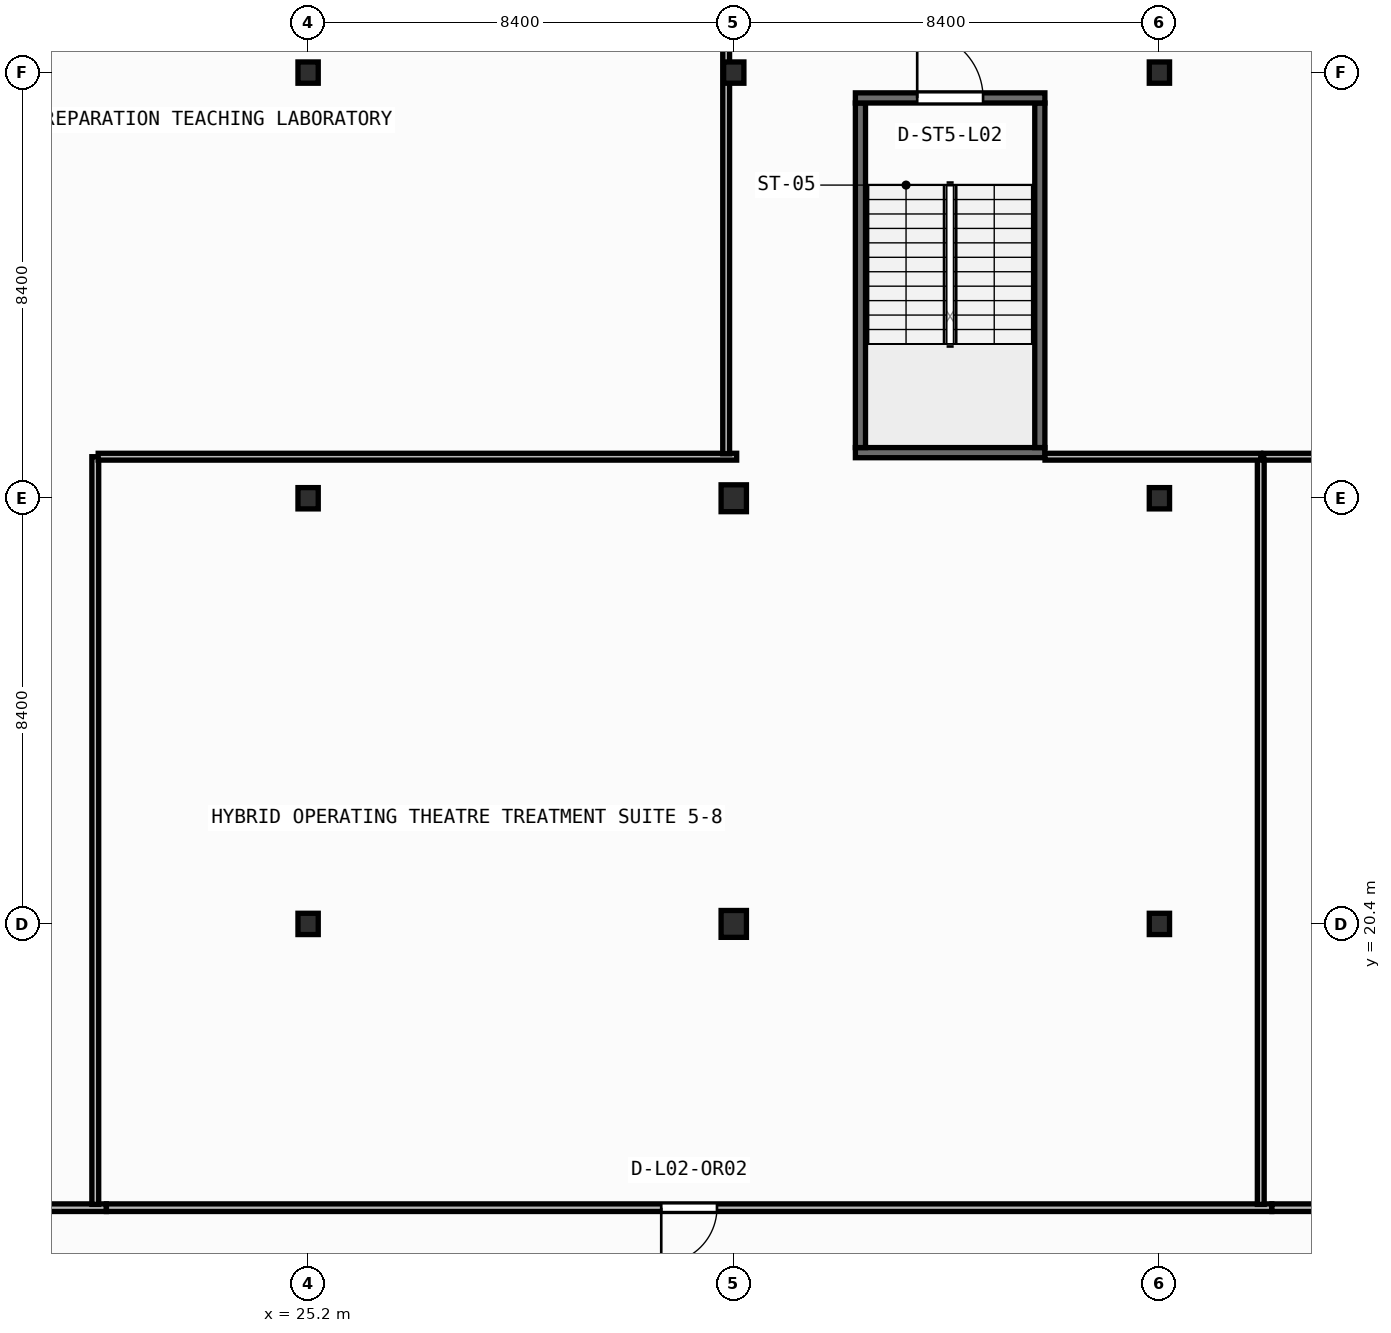
"""IFC4 building model, lengths in metres.
Left out: names, types, materials, properties, quantities, classifications, styles, units other than length and angle.
Written with IfcOpenShell. Run it as: python <this file> out.ifc"""

import sys

from ifc_helpers import new_model, si_unit, direction, frame, frame_2d, origin, origin_2d, place, context, subcontext, project, spatial, rectangle, i_section, extrude, element, fill, save


model = new_model("IFC4")
c1 = context("Model", 3, precision=1e-05, world=origin(), true_north=direction((0.0, 1.0)))
c2 = subcontext(c1, "Body", "Model", "MODEL_VIEW")
j1 = project(units=[si_unit("LENGTHUNIT", "METRE"), si_unit("PLANEANGLEUNIT", "RADIAN")], contexts=[c1])
p1 = place(None, origin())
s1 = spatial("IfcSite", under=j1, at=p1, CompositionType="ELEMENT")
p2 = place(p1, origin())
s2 = spatial("IfcBuilding", under=s1, at=p2, CompositionType="ELEMENT")
p3 = place(p2, frame((0.0, 0.0, 9.0)))
s3 = spatial("IfcBuildingStorey", under=s2, at=p3, CompositionType="ELEMENT", Elevation=9.0)
p4 = place(p3, frame((25.2, 20.4, 0.0), z_axis=(0.0, 0.0, 1.0), x_axis=(1.0, 0.0, 0.0)))
e1 = element("IfcColumn", 1, at=p4, inside=s3, PredefinedType="COLUMN", context=c2, shape_type="SweptSolid", body=[
    extrude(i_section(OverallWidth=0.4, OverallDepth=0.42, WebThickness=0.025, FlangeThickness=0.04, at=origin_2d()), origin(), (0.0, 0.0, 1.0), 4.5),
])
p5 = place(p3, frame((33.6, 20.4, 0.0), z_axis=(0.0, 0.0, 1.0), x_axis=(1.0, 0.0, 0.0)))
e2 = element("IfcColumn", 2, at=p5, inside=s3, PredefinedType="COLUMN", context=c2, shape_type="SweptSolid", body=[
    extrude(i_section(OverallWidth=0.5, OverallDepth=0.53, WebThickness=0.028, FlangeThickness=0.045, at=origin_2d()), origin(), (0.0, 0.0, 1.0), 4.5),
])
for number, where, z_axis, x_axis in (
    (3, (42.0, 20.4, 0.0), (0.0, 0.0, 1.0), (1.0, 0.0, 0.0)),
    (4, (25.2, 28.8, 0.0), (0.0, 0.0, 1.0), (1.0, 0.0, 0.0)),
):
    element("IfcColumn", number, at=place(p3, frame(where, z_axis=z_axis, x_axis=x_axis)), inside=s3, PredefinedType="COLUMN", context=c2, shape_type="SweptSolid", body=[
        extrude(i_section(OverallWidth=0.4, OverallDepth=0.42, WebThickness=0.025, FlangeThickness=0.04, at=origin_2d()), origin(), (0.0, 0.0, 1.0), 4.5),
    ])
p6 = place(p3, frame((33.6, 28.8, 0.0), z_axis=(0.0, 0.0, 1.0), x_axis=(1.0, 0.0, 0.0)))
e5 = element("IfcColumn", 5, at=p6, inside=s3, PredefinedType="COLUMN", context=c2, shape_type="SweptSolid", body=[
    extrude(i_section(OverallWidth=0.5, OverallDepth=0.53, WebThickness=0.028, FlangeThickness=0.045, at=origin_2d()), origin(), (0.0, 0.0, 1.0), 4.5),
])
for number, where, z_axis, x_axis in (
    (6, (42.0, 28.8, 0.0), (0.0, 0.0, 1.0), (1.0, 0.0, 0.0)),
    (7, (25.2, 37.2, 0.0), (0.0, 0.0, 1.0), (1.0, 0.0, 0.0)),
    (8, (33.6, 37.2, 0.0), (0.0, 0.0, 1.0), (1.0, 0.0, 0.0)),
    (9, (42.0, 37.2, 0.0), (0.0, 0.0, 1.0), (1.0, 0.0, 0.0)),
):
    element("IfcColumn", number, at=place(p3, frame(where, z_axis=z_axis, x_axis=x_axis)), inside=s3, PredefinedType="COLUMN", context=c2, shape_type="SweptSolid", body=[
        extrude(i_section(OverallWidth=0.4, OverallDepth=0.42, WebThickness=0.025, FlangeThickness=0.04, at=origin_2d()), origin(), (0.0, 0.0, 1.0), 4.5),
    ])
p7 = place(p3, frame((36.0, 29.7, 0.0), z_axis=(0.0, 0.0, 1.0), x_axis=(1.0, 0.0, 0.0)))
e10 = element("IfcWall", 10, at=p7, inside=s3, PredefinedType="SHEAR", context=c2, shape_type="SweptSolid", body=[
    extrude(rectangle(XDim=3.74, YDim=0.2, at=frame_2d((1.87, 0.0))), origin(), (0.0, 0.0, 1.0), 4.25),
])
for number, where, z_axis, x_axis in (
    (11, (36.1, 29.8, 0.0), (0.0, 0.0, 1.0), (0.0, 1.0, 0.0)),
    (12, (39.64, 29.8, 0.0), (0.0, 0.0, 1.0), (0.0, 1.0, 0.0)),
):
    element("IfcWall", number, at=place(p3, frame(where, z_axis=z_axis, x_axis=x_axis)), inside=s3, PredefinedType="SHEAR", context=c2, shape_type="SweptSolid", body=[
        extrude(rectangle(XDim=6.8, YDim=0.2, at=frame_2d((3.4, 0.0))), origin(), (0.0, 0.0, 1.0), 4.25),
    ])
p8 = place(p3, frame((36.0, 36.7, 0.0), z_axis=(0.0, 0.0, 1.0), x_axis=(1.0, 0.0, 0.0)))
e13 = element("IfcWall", 13, at=p8, inside=s3, PredefinedType="SHEAR", context=c2, shape_type="SweptSolid", body=[
    extrude(rectangle(XDim=3.74, YDim=0.2, at=frame_2d((1.87, 0.0))), origin(), (0.0, 0.0, 1.0), 4.25),
])
p9 = place(p8, frame((1.22, 0.0, 0.0)))
e14 = element("IfcOpeningElement", 14, at=p9, cuts=e13, PredefinedType="OPENING", context=c2, shape_type="SweptSolid", body=[
    extrude(rectangle(XDim=1.3, YDim=2.15, at=frame_2d((0.65, 1.075))), frame((0.0, 0.11, 0.0), z_axis=(0.0, -1.0, 0.0), x_axis=(1.0, 0.0, 0.0)), (0.0, 0.0, 1.0), 0.22),
])
p10 = place(p3, frame((21.218, 14.8, 0.0), z_axis=(0.0, 0.0, 1.0), x_axis=(-1.0, 0.0, 0.0)))
e15 = element("IfcWall", 15, at=p10, inside=s3, PredefinedType="PARTITIONING", context=c2, shape_type="SweptSolid", body=[
    extrude(rectangle(XDim=14.126, YDim=0.15, at=frame_2d((7.063, 0.0))), origin(), (0.0, 0.0, 1.0), 4.25),
])
p11 = place(p10, frame((6.513, 0.0, 0.0)))
e16 = element("IfcOpeningElement", 16, at=p11, cuts=e15, PredefinedType="OPENING", context=c2, shape_type="SweptSolid", body=[
    extrude(rectangle(XDim=1.1, YDim=2.1, at=frame_2d((0.55, 1.05))), frame((0.0, 0.085, 0.0), z_axis=(0.0, -1.0, 0.0), x_axis=(1.0, 0.0, 0.0)), (0.0, 0.0, 1.0), 0.17),
])
p12 = place(p3, frame((44.218, 14.8, 0.0), z_axis=(0.0, 0.0, 1.0), x_axis=(-1.0, 0.0, 0.0)))
e17 = element("IfcWall", 17, at=p12, inside=s3, PredefinedType="PARTITIONING", context=c2, shape_type="SweptSolid", body=[
    extrude(rectangle(XDim=22.998, YDim=0.15, at=frame_2d((11.499, 0.0))), origin(), (0.0, 0.0, 1.0), 4.25),
])
p13 = place(p12, frame((10.949, 0.0, 0.0)))
e18 = element("IfcOpeningElement", 18, at=p13, cuts=e17, PredefinedType="OPENING", context=c2, shape_type="SweptSolid", body=[
    extrude(rectangle(XDim=1.1, YDim=2.1, at=frame_2d((0.55, 1.05))), frame((0.0, 0.085, 0.0), z_axis=(0.0, -1.0, 0.0), x_axis=(1.0, 0.0, 0.0)), (0.0, 0.0, 1.0), 0.17),
])
p14 = place(p3, frame((70.168, 14.8, 0.0), z_axis=(0.0, 0.0, 1.0), x_axis=(-1.0, 0.0, 0.0)))
e19 = element("IfcWall", 19, at=p14, inside=s3, PredefinedType="PARTITIONING", context=c2, shape_type="SweptSolid", body=[
    extrude(rectangle(XDim=25.948, YDim=0.15, at=frame_2d((12.974, 0.0))), origin(), (0.0, 0.0, 1.0), 4.25),
])
p15 = place(p14, frame((12.424, 0.0, 0.0)))
e20 = element("IfcOpeningElement", 20, at=p15, cuts=e19, PredefinedType="OPENING", context=c2, shape_type="SweptSolid", body=[
    extrude(rectangle(XDim=1.1, YDim=2.1, at=frame_2d((0.55, 1.05))), frame((0.0, 0.085, 0.0), z_axis=(0.0, -1.0, 0.0), x_axis=(1.0, 0.0, 0.0)), (0.0, 0.0, 1.0), 0.17),
])
for number, where, z_axis, x_axis in (
    (21, (21.0, 14.865, 0.0), (0.0, 0.0, 1.0), (0.0, 1.0, 0.0)),
    (22, (44.0, 14.865, 0.0), (0.0, 0.0, 1.0), (0.0, 1.0, 0.0)),
):
    element("IfcWall", number, at=place(p3, frame(where, z_axis=z_axis, x_axis=x_axis)), inside=s3, PredefinedType="PARTITIONING", context=c2, shape_type="SweptSolid", body=[
        extrude(rectangle(XDim=14.755, YDim=0.135, at=frame_2d((7.377, 0.0))), origin(), (0.0, 0.0, 1.0), 4.25),
    ])
p16 = place(p3, frame((33.657, 29.62, 0.0), z_axis=(0.0, 0.0, 1.0), x_axis=(-1.0, 0.0, 0.0)))
e23 = element("IfcWall", 23, at=p16, inside=s3, PredefinedType="PARTITIONING", context=c2, shape_type="SweptSolid", body=[
    extrude(rectangle(XDim=12.6, YDim=0.135, at=frame_2d((6.3, 0.0))), origin(), (0.0, 0.0, 1.0), 4.25),
])
p17 = place(p3, frame((44.0, 29.62, 0.0), z_axis=(0.0, 0.0, 1.0), x_axis=(-1.0, 0.0, 0.0)))
e24 = element("IfcWall", 24, at=p17, inside=s3, PredefinedType="PARTITIONING", context=c2, shape_type="SweptSolid", body=[
    extrude(rectangle(XDim=4.258, YDim=0.135, at=frame_2d((2.129, 0.0))), origin(), (0.0, 0.0, 1.0), 4.25),
])
p18 = place(p3, frame((70.035, 29.62, 0.0), z_axis=(0.0, 0.0, 1.0), x_axis=(-1.0, 0.0, 0.0)))
e25 = element("IfcWall", 25, at=p18, inside=s3, PredefinedType="PARTITIONING", context=c2, shape_type="SweptSolid", body=[
    extrude(rectangle(XDim=25.977, YDim=0.135, at=frame_2d((12.989, 0.0))), origin(), (0.0, 0.0, 1.0), 4.25),
])
p19 = place(p3, frame((33.45, 29.677, 0.0), z_axis=(0.0, 0.0, 1.0), x_axis=(0.0, 1.0, 0.0)))
e26 = element("IfcWall", 26, at=p19, inside=s3, PredefinedType="PARTITIONING", context=c2, shape_type="SweptSolid", body=[
    extrude(rectangle(XDim=12.962, YDim=0.135, at=frame_2d((6.481, 0.0))), origin(), (0.0, 0.0, 1.0), 3.623),
])
p20 = place(p9, origin())
e27 = element("IfcDoor", 27, at=p20, inside=s3, OperationType="SINGLE_SWING_LEFT", PredefinedType="DOOR", context=c2, shape_type="SweptSolid", body=[
    extrude(rectangle(XDim=1.3, YDim=2.15, at=frame_2d((0.65, 1.075))), frame((0.0, 0.025, 0.0), z_axis=(0.0, -1.0, 0.0), x_axis=(1.0, 0.0, 0.0)), (0.0, 0.0, 1.0), 0.05),
])
fill(e14, e27)
p21 = place(p13, origin())
e28 = element("IfcDoor", 28, at=p21, inside=s3, OperationType="SINGLE_SWING_RIGHT", PredefinedType="DOOR", context=c2, shape_type="SweptSolid", body=[
    extrude(rectangle(XDim=1.1, YDim=2.1, at=frame_2d((0.55, 1.05))), frame((0.0, 0.025, 0.0), z_axis=(0.0, -1.0, 0.0), x_axis=(1.0, 0.0, 0.0)), (0.0, 0.0, 1.0), 0.05),
])
fill(e18, e28)
save(model, sys.argv[1])
